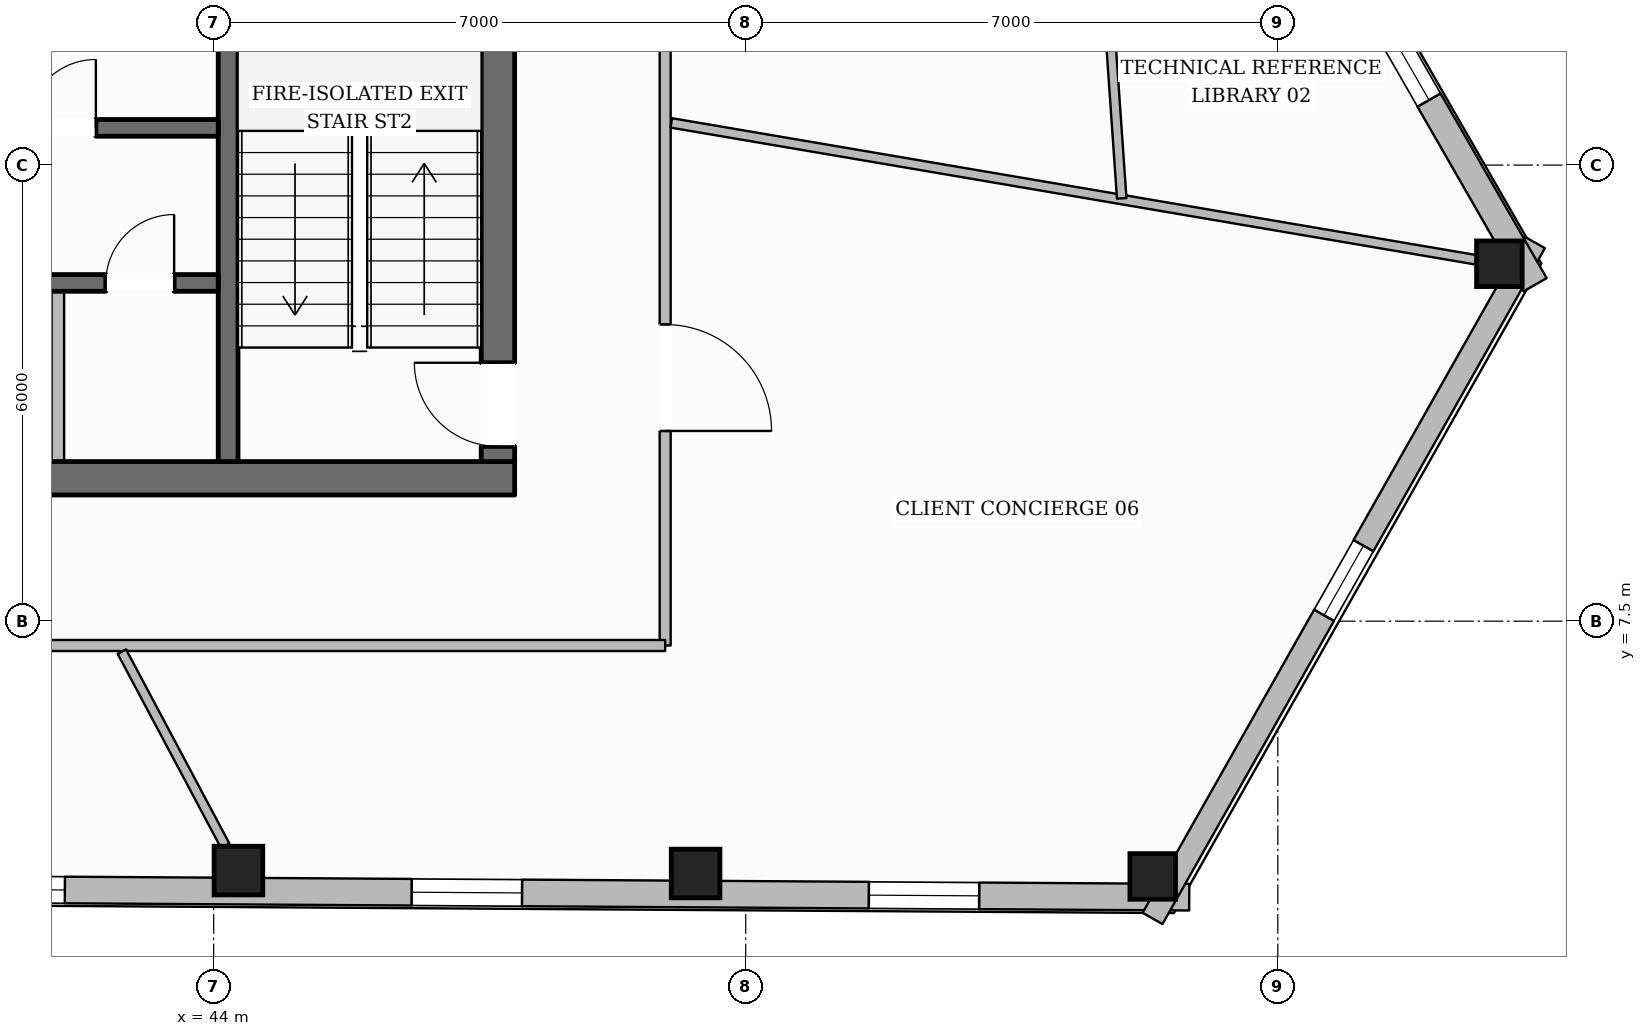
"""IFC4 building model, lengths in metres.
Left out: names, types, materials, properties, quantities, classifications, styles, units other than length and angle.
Written with IfcOpenShell. Run it as: python <this file> out.ifc"""

import sys

from ifc_helpers import new_model, si_unit, direction, frame, frame_2d, origin, origin_2d, place, context, subcontext, project, spatial, rectangle, hollow_rectangle, extrude, element, fill, save


model = new_model("IFC4")
c1 = context("Model", 3, precision=1e-05, world=origin(), true_north=direction((0.0, 1.0)))
c2 = subcontext(c1, "Body", "Model", "MODEL_VIEW")
j1 = project(units=[si_unit("LENGTHUNIT", "METRE"), si_unit("PLANEANGLEUNIT", "RADIAN")], contexts=[c1])
p1 = place(None, origin())
s1 = spatial("IfcSite", under=j1, at=p1, CompositionType="ELEMENT")
p2 = place(p1, origin())
s2 = spatial("IfcBuilding", under=s1, at=p2, CompositionType="ELEMENT")
p3 = place(p2, frame((0.0, 0.0, 172.7)))
s3 = spatial("IfcBuildingStorey", under=s2, at=p3, CompositionType="ELEMENT", Elevation=172.7)
p4 = place(p3, frame((28.04, 9.38, 0.0), z_axis=(0.0, 0.0, 1.0), x_axis=(1.0, 0.0, 0.0)))
e1 = element("IfcWall", 1, at=p4, inside=s3, PredefinedType="SOLIDWALL", context=c2, shape_type="SweptSolid", body=[
    extrude(rectangle(XDim=19.92, YDim=0.44, at=frame_2d((9.96, 0.0))), origin(), (0.0, 0.0, 1.0), 3.6),
])
p5 = place(p4, frame((10.46, 0.0, 0.0)))
e2 = element("IfcOpeningElement", 2, at=p5, cuts=e1, PredefinedType="OPENING", context=c2, shape_type="SweptSolid", body=[
    extrude(rectangle(XDim=1.4, YDim=2.2, at=frame_2d((0.7, 1.1))), frame((0.0, 0.23, 0.0), z_axis=(0.0, -1.0, 0.0), x_axis=(1.0, 0.0, 0.0)), (0.0, 0.0, 1.0), 0.46),
])
p6 = place(p3, frame((47.74, 9.6, 0.0), z_axis=(0.0, 0.0, 1.0), x_axis=(0.0, 1.0, 0.0)))
e3 = element("IfcWall", 3, at=p6, inside=s3, PredefinedType="SOLIDWALL", context=c2, shape_type="SweptSolid", body=[
    extrude(rectangle(XDim=13.0, YDim=0.44, at=frame_2d((6.5, 0.0))), origin(), (0.0, 0.0, 1.0), 3.6),
])
p7 = place(p6, frame((0.2, 0.0, 0.0)))
e4 = element("IfcOpeningElement", 4, at=p7, cuts=e3, PredefinedType="OPENING", context=c2, shape_type="SweptSolid", body=[
    extrude(rectangle(XDim=1.1, YDim=2.15, at=frame_2d((0.55, 1.075))), frame((0.0, 0.23, 0.0), z_axis=(0.0, -1.0, 0.0), x_axis=(1.0, 0.0, 0.0)), (0.0, 0.0, 1.0), 0.46),
])
p8 = place(p6, frame((8.4, 0.0, 0.0)))
e5 = element("IfcOpeningElement", 5, at=p8, cuts=e3, PredefinedType="OPENING", context=c2, shape_type="SweptSolid", body=[
    extrude(rectangle(XDim=0.9, YDim=2.1, at=frame_2d((0.45, 1.05))), frame((0.0, 0.23, 0.0), z_axis=(0.0, -1.0, 0.0), x_axis=(1.0, 0.0, 0.0)), (0.0, 0.0, 1.0), 0.46),
])
p9 = place(p3, frame((44.19, 9.6, 0.0), z_axis=(0.0, 0.0, 1.0), x_axis=(0.0, 1.0, 0.0)))
e6 = element("IfcWall", 6, at=p9, inside=s3, PredefinedType="SHEAR", context=c2, shape_type="SweptSolid", body=[
    extrude(rectangle(XDim=13.0, YDim=0.26, at=frame_2d((6.5, 0.0))), origin(), (0.0, 0.0, 1.0), 3.6),
])
p10 = place(p9, frame((10.925, 0.0, 0.0)))
e7 = element("IfcOpeningElement", 7, at=p10, cuts=e6, PredefinedType="OPENING", context=c2, shape_type="SweptSolid", body=[
    extrude(rectangle(XDim=1.25, YDim=2.25, at=frame_2d((0.625, 1.125))), frame((0.0, 0.14, 0.0), z_axis=(0.0, -1.0, 0.0), x_axis=(1.0, 0.0, 0.0)), (0.0, 0.0, 1.0), 0.28),
])
p11 = place(p3, frame((31.94, 13.99, 0.0), z_axis=(0.0, 0.0, 1.0), x_axis=(1.0, 0.0, 0.0)))
e8 = element("IfcWall", 8, at=p11, inside=s3, PredefinedType="SOLIDWALL", context=c2, shape_type="SweptSolid", body=[
    extrude(rectangle(XDim=12.12, YDim=0.22, at=frame_2d((6.06, 0.0))), origin(), (0.0, 0.0, 1.0), 3.6),
])
p12 = place(p11, frame((1.11, 0.0, 0.0)))
e9 = element("IfcOpeningElement", 9, at=p12, cuts=e8, PredefinedType="OPENING", context=c2, shape_type="SweptSolid", body=[
    extrude(rectangle(XDim=0.9, YDim=2.1, at=frame_2d((0.45, 1.05))), frame((0.0, 0.12, 0.0), z_axis=(0.0, -1.0, 0.0), x_axis=(1.0, 0.0, 0.0)), (0.0, 0.0, 1.0), 0.24),
])
p13 = place(p11, frame((5.16, 0.0, 0.0)))
e10 = element("IfcOpeningElement", 10, at=p13, cuts=e8, PredefinedType="OPENING", context=c2, shape_type="SweptSolid", body=[
    extrude(rectangle(XDim=0.9, YDim=2.1, at=frame_2d((0.45, 1.05))), frame((0.0, 0.12, 0.0), z_axis=(0.0, -1.0, 0.0), x_axis=(1.0, 0.0, 0.0)), (0.0, 0.0, 1.0), 0.24),
])
p14 = place(p11, frame((9.61, 0.0, 0.0)))
e11 = element("IfcOpeningElement", 11, at=p14, cuts=e8, PredefinedType="OPENING", context=c2, shape_type="SweptSolid", body=[
    extrude(rectangle(XDim=0.9, YDim=2.1, at=frame_2d((0.45, 1.05))), frame((0.0, 0.12, 0.0), z_axis=(0.0, -1.0, 0.0), x_axis=(1.0, 0.0, 0.0)), (0.0, 0.0, 1.0), 0.24),
])
p15 = place(p3, frame((40.28, 11.95, 0.0), z_axis=(0.0, 0.0, 1.0), x_axis=(1.0, 0.0, 0.0)))
e12 = element("IfcWall", 12, at=p15, inside=s3, PredefinedType="SOLIDWALL", context=c2, shape_type="SweptSolid", body=[
    extrude(rectangle(XDim=3.78, YDim=0.22, at=frame_2d((1.89, 0.0))), origin(), (0.0, 0.0, 1.0), 3.6),
])
p16 = place(p15, frame((0.47, 0.0, 0.0)))
e13 = element("IfcOpeningElement", 13, at=p16, cuts=e12, PredefinedType="OPENING", context=c2, shape_type="SweptSolid", body=[
    extrude(rectangle(XDim=0.9, YDim=2.1, at=frame_2d((0.45, 1.05))), frame((0.0, 0.12, 0.0), z_axis=(0.0, -1.0, 0.0), x_axis=(1.0, 0.0, 0.0)), (0.0, 0.0, 1.0), 0.24),
])
p17 = place(p15, frame((2.3, 0.0, 0.0)))
e14 = element("IfcOpeningElement", 14, at=p17, cuts=e12, PredefinedType="OPENING", context=c2, shape_type="SweptSolid", body=[
    extrude(rectangle(XDim=0.9, YDim=2.1, at=frame_2d((0.45, 1.05))), frame((0.0, 0.12, 0.0), z_axis=(0.0, -1.0, 0.0), x_axis=(1.0, 0.0, 0.0)), (0.0, 0.0, 1.0), 0.24),
])
for number, where, z_axis, x_axis in (
    (15, (44.326, 4.219, 0.0), (0.0, 0.0, 1.0), (1.0, 0.0, 0.0)),
    (16, (50.34, 4.18, 0.0), (0.0, 0.0, 1.0), (1.0, 0.0, 0.0)),
):
    element("IfcColumn", number, at=place(p3, frame(where, z_axis=z_axis, x_axis=x_axis)), inside=s3, PredefinedType="COLUMN", context=c2, shape_type="SweptSolid", body=[
        extrude(hollow_rectangle(XDim=0.64, YDim=0.64, WallThickness=0.028, at=origin_2d()), origin(), (0.0, 0.0, 1.0), 3.6),
    ])
for number, where, z_axis, x_axis in (
    (17, (56.354, 4.142, 0.0), (0.0, 0.0, 1.0), (1.0, 0.0, 0.0)),
    (18, (60.915, 12.202, 0.0), (0.0, 0.0, 1.0), (1.0, 0.0, 0.0)),
):
    element("IfcColumn", number, at=place(p3, frame(where, z_axis=z_axis, x_axis=x_axis)), inside=s3, PredefinedType="COLUMN", context=c2, shape_type="SweptSolid", body=[
        extrude(hollow_rectangle(XDim=0.6, YDim=0.6, WallThickness=0.028, at=origin_2d()), origin(), (0.0, 0.0, 1.0), 3.6),
    ])
p18 = place(p3, frame((56.835, 3.869, 0.0), z_axis=(0.0, 0.0, 1.0), x_axis=(-0.999979523666, 0.006399394434, 0.0)))
e19 = element("IfcWall", 19, at=p18, inside=s3, PredefinedType="STANDARD", context=c2, shape_type="SweptSolid", body=[
    extrude(rectangle(XDim=37.044, YDim=0.35, at=frame_2d((18.522, 0.0))), origin(), (0.0, 0.0, 1.0), 3.132),
])
p19 = place(p18, frame((32.836, 0.0, 0.65)))
e20 = element("IfcOpeningElement", 20, at=p19, cuts=e19, PredefinedType="OPENING", context=c2, shape_type="SweptSolid", body=[
    extrude(rectangle(XDim=1.45, YDim=1.75, at=frame_2d((0.725, 0.875))), frame((0.0, 0.185, 0.0), z_axis=(0.0, -1.0, 0.0), x_axis=(1.0, 0.0, 0.0)), (0.0, 0.0, 1.0), 0.37),
])
p20 = place(p18, frame((26.822, 0.0, 0.65)))
e21 = element("IfcOpeningElement", 21, at=p20, cuts=e19, PredefinedType="OPENING", context=c2, shape_type="SweptSolid", body=[
    extrude(rectangle(XDim=1.45, YDim=1.75, at=frame_2d((0.725, 0.875))), frame((0.0, 0.185, 0.0), z_axis=(0.0, -1.0, 0.0), x_axis=(1.0, 0.0, 0.0)), (0.0, 0.0, 1.0), 0.37),
])
p21 = place(p18, frame((14.793, 0.0, 0.65)))
e22 = element("IfcOpeningElement", 22, at=p21, cuts=e19, PredefinedType="OPENING", context=c2, shape_type="SweptSolid", body=[
    extrude(rectangle(XDim=1.45, YDim=1.75, at=frame_2d((0.725, 0.875))), frame((0.0, 0.185, 0.0), z_axis=(0.0, -1.0, 0.0), x_axis=(1.0, 0.0, 0.0)), (0.0, 0.0, 1.0), 0.37),
])
p22 = place(p18, frame((8.779, 0.0, 0.65)))
e23 = element("IfcOpeningElement", 23, at=p22, cuts=e19, PredefinedType="OPENING", context=c2, shape_type="SweptSolid", body=[
    extrude(rectangle(XDim=1.45, YDim=1.75, at=frame_2d((0.725, 0.875))), frame((0.0, 0.185, 0.0), z_axis=(0.0, -1.0, 0.0), x_axis=(1.0, 0.0, 0.0)), (0.0, 0.0, 1.0), 0.37),
])
p23 = place(p18, frame((2.764, 0.0, 0.65)))
e24 = element("IfcOpeningElement", 24, at=p23, cuts=e19, PredefinedType="OPENING", context=c2, shape_type="SweptSolid", body=[
    extrude(rectangle(XDim=1.45, YDim=1.75, at=frame_2d((0.725, 0.875))), frame((0.0, 0.185, 0.0), z_axis=(0.0, -1.0, 0.0), x_axis=(1.0, 0.0, 0.0)), (0.0, 0.0, 1.0), 0.37),
])
p24 = place(p3, frame((61.383, 12.481, 0.0), z_axis=(0.0, 0.0, 1.0), x_axis=(-0.492449334401, -0.87034111304, 0.0)))
e25 = element("IfcWall", 25, at=p24, inside=s3, PredefinedType="STANDARD", context=c2, shape_type="SweptSolid", body=[
    extrude(rectangle(XDim=10.217, YDim=0.3, at=frame_2d((5.108, 0.0))), origin(), (0.0, 0.0, 1.0), 3.132),
])
p25 = place(p24, frame((4.583, 0.0, 0.65)))
e26 = element("IfcOpeningElement", 26, at=p25, cuts=e25, PredefinedType="OPENING", context=c2, shape_type="SweptSolid", body=[
    extrude(rectangle(XDim=1.05, YDim=1.7, at=frame_2d((0.525, 0.85))), frame((0.0, 0.16, 0.0), z_axis=(0.0, -1.0, 0.0), x_axis=(1.0, 0.0, 0.0)), (0.0, 0.0, 1.0), 0.32),
])
p26 = place(p3, frame((42.661, 44.531, 0.0), z_axis=(0.0, 0.0, 1.0), x_axis=(0.497996481168, -0.867179049991, 0.0)))
e27 = element("IfcWall", 27, at=p26, inside=s3, PredefinedType="STANDARD", context=c2, shape_type="SweptSolid", body=[
    extrude(rectangle(XDim=37.599, YDim=0.35, at=frame_2d((18.799, 0.0))), origin(), (0.0, 0.0, 1.0), 3.132),
])
p27 = place(p26, frame((33.346, 0.0, 0.65)))
e28 = element("IfcOpeningElement", 28, at=p27, cuts=e27, PredefinedType="OPENING", context=c2, shape_type="SweptSolid", body=[
    extrude(rectangle(XDim=1.45, YDim=1.75, at=frame_2d((0.725, 0.875))), frame((0.0, 0.185, 0.0), z_axis=(0.0, -1.0, 0.0), x_axis=(1.0, 0.0, 0.0)), (0.0, 0.0, 1.0), 0.37),
])
p28 = place(p26, frame((27.238, 0.0, 0.65)))
e29 = element("IfcOpeningElement", 29, at=p28, cuts=e27, PredefinedType="OPENING", context=c2, shape_type="SweptSolid", body=[
    extrude(rectangle(XDim=1.45, YDim=1.75, at=frame_2d((0.725, 0.875))), frame((0.0, 0.185, 0.0), z_axis=(0.0, -1.0, 0.0), x_axis=(1.0, 0.0, 0.0)), (0.0, 0.0, 1.0), 0.37),
])
p29 = place(p26, frame((15.021, 0.0, 0.65)))
e30 = element("IfcOpeningElement", 30, at=p29, cuts=e27, PredefinedType="OPENING", context=c2, shape_type="SweptSolid", body=[
    extrude(rectangle(XDim=1.45, YDim=1.75, at=frame_2d((0.725, 0.875))), frame((0.0, 0.185, 0.0), z_axis=(0.0, -1.0, 0.0), x_axis=(1.0, 0.0, 0.0)), (0.0, 0.0, 1.0), 0.37),
])
p30 = place(p26, frame((8.913, 0.0, 0.65)))
e31 = element("IfcOpeningElement", 31, at=p30, cuts=e27, PredefinedType="OPENING", context=c2, shape_type="SweptSolid", body=[
    extrude(rectangle(XDim=1.45, YDim=1.75, at=frame_2d((0.725, 0.875))), frame((0.0, 0.185, 0.0), z_axis=(0.0, -1.0, 0.0), x_axis=(1.0, 0.0, 0.0)), (0.0, 0.0, 1.0), 0.37),
])
p31 = place(p26, frame((2.805, 0.0, 0.65)))
e32 = element("IfcOpeningElement", 32, at=p31, cuts=e27, PredefinedType="OPENING", context=c2, shape_type="SweptSolid", body=[
    extrude(rectangle(XDim=1.45, YDim=1.75, at=frame_2d((0.725, 0.875))), frame((0.0, 0.185, 0.0), z_axis=(0.0, -1.0, 0.0), x_axis=(1.0, 0.0, 0.0)), (0.0, 0.0, 1.0), 0.37),
])
p32 = place(p3, frame((41.95, 9.52, 0.0), z_axis=(0.0, 0.0, 1.0), x_axis=(0.0, 1.0, 0.0)))
e33 = element("IfcWall", 33, at=p32, inside=s3, PredefinedType="PARTITIONING", context=c2, shape_type="SweptSolid", body=[
    extrude(rectangle(XDim=2.32, YDim=0.165, at=frame_2d((1.16, 0.0))), origin(), (0.0, 0.0, 1.0), 3.6),
])
p33 = place(p3, frame((49.94, 15.1, 0.0), z_axis=(0.0, 0.0, 1.0), x_axis=(0.0, -1.0, 0.0)))
e34 = element("IfcWall", 34, at=p33, inside=s3, PredefinedType="PARTITIONING", context=c2, shape_type="SweptSolid", body=[
    extrude(rectangle(XDim=7.92, YDim=0.145, at=frame_2d((3.96, 0.0))), origin(), (0.0, 0.0, 1.0), 3.6),
])
p34 = place(p33, frame((3.697, 0.0, 0.0)))
e35 = element("IfcOpeningElement", 35, at=p34, cuts=e34, PredefinedType="OPENING", context=c2, shape_type="SweptSolid", body=[
    extrude(rectangle(XDim=1.4, YDim=2.2, at=frame_2d((0.7, 1.1))), frame((0.0, 0.083, 0.0), z_axis=(0.0, -1.0, 0.0), x_axis=(1.0, 0.0, 0.0)), (0.0, 0.0, 1.0), 0.165),
])
p35 = place(p3, frame((49.94, 7.18, 0.0), z_axis=(0.0, 0.0, 1.0), x_axis=(-1.0, 0.0, 0.0)))
e36 = element("IfcWall", 36, at=p35, inside=s3, PredefinedType="PARTITIONING", context=c2, shape_type="SweptSolid", body=[
    extrude(rectangle(XDim=23.88, YDim=0.145, at=frame_2d((11.94, 0.0))), origin(), (0.0, 0.0, 1.0), 3.6),
])
p36 = place(p35, frame((12.827, 0.0, 0.0)))
e37 = element("IfcOpeningElement", 37, at=p36, cuts=e36, PredefinedType="OPENING", context=c2, shape_type="SweptSolid", body=[
    extrude(rectangle(XDim=0.98, YDim=2.15, at=frame_2d((0.49, 1.075))), frame((0.0, 0.083, 0.0), z_axis=(0.0, -1.0, 0.0), x_axis=(1.0, 0.0, 0.0)), (0.0, 0.0, 1.0), 0.165),
])
p37 = place(p35, frame((21.444, 0.0, 0.0)))
e38 = element("IfcOpeningElement", 38, at=p37, cuts=e36, PredefinedType="OPENING", context=c2, shape_type="SweptSolid", body=[
    extrude(rectangle(XDim=0.98, YDim=2.15, at=frame_2d((0.49, 1.075))), frame((0.0, 0.083, 0.0), z_axis=(0.0, -1.0, 0.0), x_axis=(1.0, 0.0, 0.0)), (0.0, 0.0, 1.0), 0.165),
])
p38 = place(p3, frame((42.792, 7.1, 0.0), z_axis=(0.0, 0.0, 1.0), x_axis=(0.469961545261, -0.882686890112, 0.0)))
e39 = element("IfcWall", 39, at=p38, inside=s3, PredefinedType="PARTITIONING", context=c2, shape_type="SweptSolid", body=[
    extrude(rectangle(XDim=2.892, YDim=0.125, at=frame_2d((1.446, 0.0))), origin(), (0.0, 0.0, 1.0), 3.6),
])
p39 = place(p3, frame((50.021, 14.055, 0.0), z_axis=(0.0, 0.0, 1.0), x_axis=(0.985839088175, -0.167694043503, 0.0)))
e40 = element("IfcWall", 40, at=p39, inside=s3, PredefinedType="PARTITIONING", context=c2, shape_type="SweptSolid", body=[
    extrude(rectangle(XDim=10.739, YDim=0.125, at=frame_2d((5.369, 0.0))), origin(), (0.0, 0.0, 1.0), 3.141),
])
p40 = place(p3, frame((55.947, 13.062, 0.0), z_axis=(0.0, 0.0, 1.0), x_axis=(-0.069486038833, 0.997582924076, 0.0)))
e41 = element("IfcWall", 41, at=p40, inside=s3, PredefinedType="PARTITIONING", context=c2, shape_type="SweptSolid", body=[
    extrude(rectangle(XDim=9.163, YDim=0.125, at=frame_2d((4.582, 0.0))), origin(), (0.0, 0.0, 1.0), 3.135),
])
p41 = place(p40, frame((4.183, 0.0, 0.0)))
e42 = element("IfcOpeningElement", 42, at=p41, cuts=e41, PredefinedType="OPENING", context=c2, shape_type="SweptSolid", body=[
    extrude(rectangle(XDim=0.98, YDim=2.15, at=frame_2d((0.49, 1.075))), frame((0.0, 0.073, 0.0), z_axis=(0.0, -1.0, 0.0), x_axis=(1.0, 0.0, 0.0)), (0.0, 0.0, 1.0), 0.145),
])
p42 = place(p21, origin())
e43 = element("IfcWindow", 43, at=p42, inside=s3, PartitioningType="SINGLE_PANEL", PredefinedType="WINDOW", context=c2, shape_type="SweptSolid", body=[
    extrude(rectangle(XDim=1.45, YDim=1.75, at=frame_2d((0.725, 0.875))), frame((0.0, 0.03, 0.0), z_axis=(0.0, -1.0, 0.0), x_axis=(1.0, 0.0, 0.0)), (0.0, 0.0, 1.0), 0.06),
])
fill(e22, e43)
p43 = place(p22, origin())
e44 = element("IfcWindow", 44, at=p43, inside=s3, PartitioningType="SINGLE_PANEL", PredefinedType="WINDOW", context=c2, shape_type="SweptSolid", body=[
    extrude(rectangle(XDim=1.45, YDim=1.75, at=frame_2d((0.725, 0.875))), frame((0.0, 0.03, 0.0), z_axis=(0.0, -1.0, 0.0), x_axis=(1.0, 0.0, 0.0)), (0.0, 0.0, 1.0), 0.06),
])
fill(e23, e44)
p44 = place(p23, origin())
e45 = element("IfcWindow", 45, at=p44, inside=s3, PartitioningType="SINGLE_PANEL", PredefinedType="WINDOW", context=c2, shape_type="SweptSolid", body=[
    extrude(rectangle(XDim=1.45, YDim=1.75, at=frame_2d((0.725, 0.875))), frame((0.0, 0.03, 0.0), z_axis=(0.0, -1.0, 0.0), x_axis=(1.0, 0.0, 0.0)), (0.0, 0.0, 1.0), 0.06),
])
fill(e24, e45)
p45 = place(p27, origin())
e46 = element("IfcWindow", 46, at=p45, inside=s3, PartitioningType="SINGLE_PANEL", PredefinedType="WINDOW", context=c2, shape_type="SweptSolid", body=[
    extrude(rectangle(XDim=1.45, YDim=1.75, at=frame_2d((0.725, 0.875))), frame((0.0, 0.03, 0.0), z_axis=(0.0, -1.0, 0.0), x_axis=(1.0, 0.0, 0.0)), (0.0, 0.0, 1.0), 0.06),
])
fill(e28, e46)
p46 = place(p25, origin())
e47 = element("IfcWindow", 47, at=p46, inside=s3, PartitioningType="SINGLE_PANEL", PredefinedType="WINDOW", context=c2, shape_type="SweptSolid", body=[
    extrude(rectangle(XDim=1.05, YDim=1.7, at=frame_2d((0.525, 0.85))), frame((0.0, 0.03, 0.0), z_axis=(0.0, -1.0, 0.0), x_axis=(1.0, 0.0, 0.0)), (0.0, 0.0, 1.0), 0.06),
])
fill(e26, e47)
p47 = place(p7, origin())
e48 = element("IfcDoor", 48, at=p47, inside=s3, OperationType="SINGLE_SWING_RIGHT", PredefinedType="DOOR", context=c2, shape_type="SweptSolid", body=[
    extrude(rectangle(XDim=1.1, YDim=2.15, at=frame_2d((0.55, 1.075))), frame((0.0, 0.025, 0.0), z_axis=(0.0, -1.0, 0.0), x_axis=(1.0, 0.0, 0.0)), (0.0, 0.0, 1.0), 0.05),
])
fill(e4, e48)
p48 = place(p14, origin())
e49 = element("IfcDoor", 49, at=p48, inside=s3, OperationType="SINGLE_SWING_RIGHT", PredefinedType="DOOR", context=c2, shape_type="SweptSolid", body=[
    extrude(rectangle(XDim=0.9, YDim=2.1, at=frame_2d((0.45, 1.05))), frame((0.0, 0.025, 0.0), z_axis=(0.0, -1.0, 0.0), x_axis=(1.0, 0.0, 0.0)), (0.0, 0.0, 1.0), 0.05),
])
fill(e11, e49)
p49 = place(p17, origin())
e50 = element("IfcDoor", 50, at=p49, inside=s3, OperationType="SINGLE_SWING_RIGHT", PredefinedType="DOOR", context=c2, shape_type="SweptSolid", body=[
    extrude(rectangle(XDim=0.9, YDim=2.1, at=frame_2d((0.45, 1.05))), frame((0.0, 0.025, 0.0), z_axis=(0.0, -1.0, 0.0), x_axis=(1.0, 0.0, 0.0)), (0.0, 0.0, 1.0), 0.05),
])
fill(e14, e50)
p50 = place(p34, origin())
e51 = element("IfcDoor", 51, at=p50, inside=s3, OperationType="SINGLE_SWING_RIGHT", PredefinedType="DOOR", context=c2, shape_type="SweptSolid", body=[
    extrude(rectangle(XDim=1.4, YDim=2.2, at=frame_2d((0.7, 1.1))), frame((0.0, 0.025, 0.0), z_axis=(0.0, -1.0, 0.0), x_axis=(1.0, 0.0, 0.0)), (0.0, 0.0, 1.0), 0.05),
])
fill(e35, e51)
save(model, sys.argv[1])
